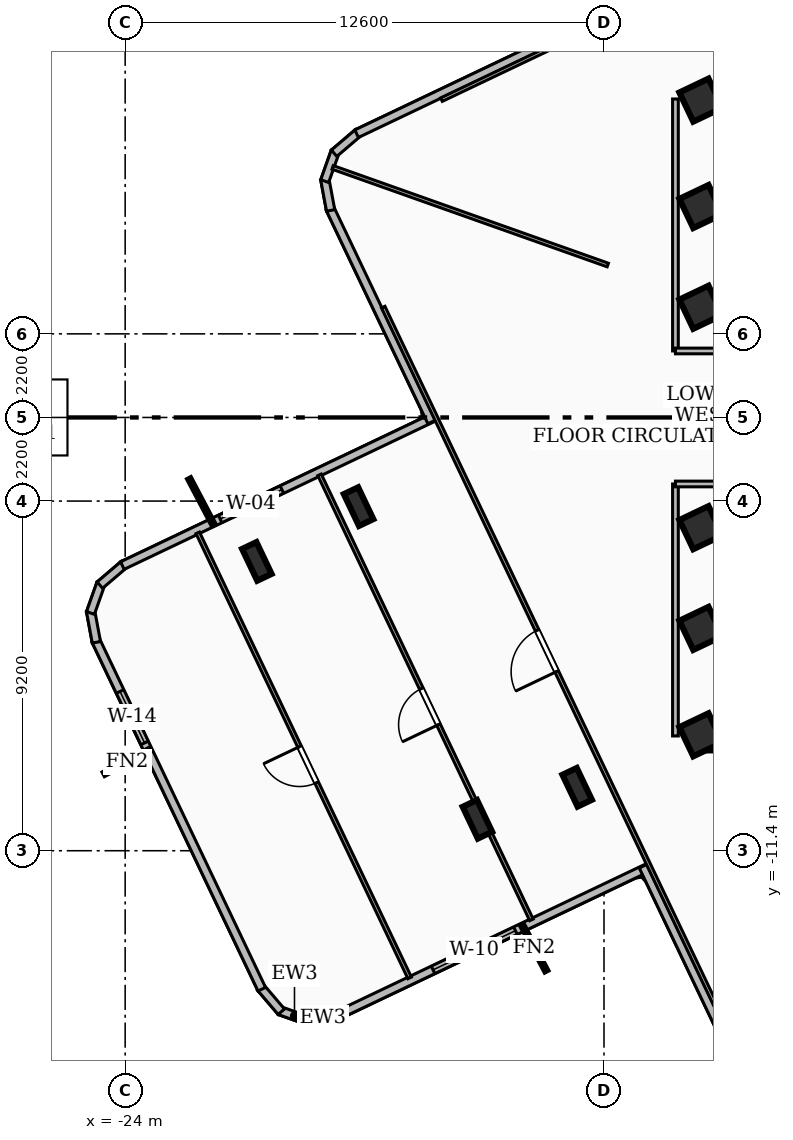
"""IFC4 building model, lengths in metres.
Left out: names, types, materials, properties, quantities, classifications, styles, units other than length and angle.
Written with IfcOpenShell. Run it as: python <this file> out.ifc"""

import sys

from ifc_helpers import new_model, si_unit, direction, frame, frame_2d, origin, origin_2d, place, context, subcontext, project, spatial, rectangle, i_section, extrude, element, fill, save


model = new_model("IFC4")
c1 = context("Model", 3, precision=1e-05, world=origin(), true_north=direction((0.0, 1.0)))
c2 = subcontext(c1, "Body", "Model", "MODEL_VIEW")
j1 = project(units=[si_unit("LENGTHUNIT", "METRE"), si_unit("PLANEANGLEUNIT", "RADIAN")], contexts=[c1])
p1 = place(None, origin())
s1 = spatial("IfcSite", under=j1, at=p1, CompositionType="ELEMENT")
p2 = place(p1, origin())
s2 = spatial("IfcBuilding", under=s1, at=p2, CompositionType="ELEMENT")
p3 = place(p2, frame((0.0, 0.0, 188.28)))
s3 = spatial("IfcBuildingStorey", under=s2, at=p3, CompositionType="ELEMENT", Elevation=188.28)
for number, where, z_axis, x_axis in (
    (1, (-8.78, 8.535, 0.0), (0.0, 0.0, 1.0), (1.0, 0.0, 0.0)),
    (2, (8.78, -8.535, 0.0), (0.0, 0.0, 1.0), (-1.0, 0.0, 0.0)),
):
    element("IfcWall", number, at=place(p3, frame(where, z_axis=z_axis, x_axis=x_axis)), inside=s3, PredefinedType="SHEAR", context=c2, shape_type="SweptSolid", body=[
        extrude(rectangle(XDim=17.56, YDim=0.45, at=frame_2d((8.78, 0.0))), origin(), (0.0, 0.0, 1.0), 4.06),
    ])
for number, where, z_axis, x_axis in (
    (3, (-8.85, -5.55, 0.0), (0.0, 0.0, 1.0), (0.903, 0.43, 0.0)),
    (4, (-8.85, -2.9, 0.0), (0.0, 0.0, 1.0), (0.903, 0.43, 0.0)),
    (5, (-8.85, 2.9, 0.0), (0.0, 0.0, 1.0), (0.903, 0.43, 0.0)),
    (6, (-8.85, 5.55, 0.0), (0.0, 0.0, 1.0), (0.903, 0.43, 0.0)),
    (7, (-8.85, 8.35, 0.0), (0.0, 0.0, 1.0), (0.903, 0.43, 0.0)),
    (8, (-8.85, -8.35, 0.0), (0.0, 0.0, 1.0), (0.903, 0.43, 0.0)),
):
    element("IfcColumn", number, at=place(p3, frame(where, z_axis=z_axis, x_axis=x_axis)), inside=s3, PredefinedType="COLUMN", context=c2, shape_type="SweptSolid", body=[
        extrude(rectangle(XDim=0.85, YDim=0.85, at=origin_2d()), origin(), (0.0, 0.0, 1.0), 4.32),
    ])
for number, where, z_axis, x_axis in (
    (9, (-17.858, -2.346, 0.0), (0.0, 0.0, 1.0), (0.903, 0.43, 0.0)),
    (10, (-12.106, -9.731, 0.0), (0.0, 0.0, 1.0), (0.903, 0.43, 0.0)),
    (11, (-20.535, -3.788, 0.0), (0.0, 0.0, 1.0), (0.903, 0.43, 0.0)),
    (12, (-14.731, -10.573, 0.0), (0.0, 0.0, 1.0), (0.903, 0.43, 0.0)),
):
    element("IfcColumn", number, at=place(p3, frame(where, z_axis=z_axis, x_axis=x_axis)), inside=s3, PredefinedType="COLUMN", context=c2, shape_type="SweptSolid", body=[
        extrude(i_section(OverallWidth=0.418, OverallDepth=0.927, WebThickness=0.019, FlangeThickness=0.032, at=origin_2d()), origin(), (0.0, 0.0, 1.0), 4.32),
    ])
p4 = place(p3, frame((-10.255, -11.848, 0.0), z_axis=(0.0, 0.0, 1.0), x_axis=(-0.902833615009, -0.429990073851, 0.0)))
e13 = element("IfcWall", 13, at=p4, inside=s3, PredefinedType="SOLIDWALL", context=c2, shape_type="SweptSolid", body=[
    extrude(rectangle(XDim=9.058, YDim=0.22, at=frame_2d((4.529, 0.0))), origin(), (0.0, 0.0, 1.0), 4.06),
])
p5 = place(p4, frame((3.85, 0.0, 0.85)))
e14 = element("IfcOpeningElement", 14, at=p5, cuts=e13, PredefinedType="OPENING", context=c2, shape_type="SweptSolid", body=[
    extrude(rectangle(XDim=2.4, YDim=1.65, at=frame_2d((1.2, 0.825))), frame((0.0, 0.12, 0.0), z_axis=(0.0, -1.0, 0.0), x_axis=(1.0, 0.0, 0.0)), (0.0, 0.0, 1.0), 0.24),
])
p6 = place(p3, frame((-18.385, -15.727, 0.0), z_axis=(0.0, 0.0, 1.0), x_axis=(-0.983152022253, -0.182789773071, 0.0)))
e15 = element("IfcWall", 15, at=p6, inside=s3, PredefinedType="SOLIDWALL", context=c2, shape_type="SweptSolid", body=[
    extrude(rectangle(XDim=0.836, YDim=0.22, at=frame_2d((0.418, 0.0))), origin(), (0.0, 0.0, 1.0), 4.06),
])
p7 = place(p3, frame((-19.158, -15.883, 0.0), z_axis=(0.0, 0.0, 1.0), x_axis=(-0.94246708165, 0.334298968001, 0.0)))
e16 = element("IfcWall", 16, at=p7, inside=s3, PredefinedType="SOLIDWALL", context=c2, shape_type="SweptSolid", body=[
    extrude(rectangle(XDim=0.82, YDim=0.22, at=frame_2d((0.41, 0.0))), origin(), (0.0, 0.0, 1.0), 4.06),
])
p8 = place(p3, frame((-19.891, -15.636, 0.0), z_axis=(0.0, 0.0, 1.0), x_axis=(-0.64893164197, 0.760846715213, 0.0)))
e17 = element("IfcWall", 17, at=p8, inside=s3, PredefinedType="SOLIDWALL", context=c2, shape_type="SweptSolid", body=[
    extrude(rectangle(XDim=0.833, YDim=0.22, at=frame_2d((0.417, 0.0))), origin(), (0.0, 0.0, 1.0), 4.06),
])
p9 = place(p3, frame((-20.405, -15.044, 0.0), z_axis=(0.0, 0.0, 1.0), x_axis=(-0.429803955781, 0.902922233415, 0.0)))
e18 = element("IfcWall", 18, at=p9, inside=s3, PredefinedType="SOLIDWALL", context=c2, shape_type="SweptSolid", body=[
    extrude(rectangle(XDim=10.163, YDim=0.22, at=frame_2d((5.081, 0.0))), origin(), (0.0, 0.0, 1.0), 4.06),
])
p10 = place(p9, frame((7.177, 0.0, 0.85)))
e19 = element("IfcOpeningElement", 19, at=p10, cuts=e18, PredefinedType="OPENING", context=c2, shape_type="SweptSolid", body=[
    extrude(rectangle(XDim=1.5, YDim=1.5, at=frame_2d((0.75, 0.75))), frame((0.0, 0.12, 0.0), z_axis=(0.0, -1.0, 0.0), x_axis=(1.0, 0.0, 0.0)), (0.0, 0.0, 1.0), 0.24),
])
p11 = place(p3, frame((-24.757, -5.916, 0.0), z_axis=(0.0, 0.0, 1.0), x_axis=(-0.182999909077, 0.983112930074, 0.0)))
e20 = element("IfcWall", 20, at=p11, inside=s3, PredefinedType="SOLIDWALL", context=c2, shape_type="SweptSolid", body=[
    extrude(rectangle(XDim=0.835, YDim=0.22, at=frame_2d((0.417, 0.0))), origin(), (0.0, 0.0, 1.0), 4.06),
])
p12 = place(p3, frame((-24.913, -5.144, 0.0), z_axis=(0.0, 0.0, 1.0), x_axis=(0.334298968001, 0.94246708165, 0.0)))
e21 = element("IfcWall", 21, at=p12, inside=s3, PredefinedType="SOLIDWALL", context=c2, shape_type="SweptSolid", body=[
    extrude(rectangle(XDim=0.82, YDim=0.22, at=frame_2d((0.41, 0.0))), origin(), (0.0, 0.0, 1.0), 4.06),
])
p13 = place(p3, frame((-24.666, -4.411, 0.0), z_axis=(0.0, 0.0, 1.0), x_axis=(0.760846715213, 0.64893164197, 0.0)))
e22 = element("IfcWall", 22, at=p13, inside=s3, PredefinedType="SOLIDWALL", context=c2, shape_type="SweptSolid", body=[
    extrude(rectangle(XDim=0.833, YDim=0.22, at=frame_2d((0.417, 0.0))), origin(), (0.0, 0.0, 1.0), 4.06),
])
p14 = place(p3, frame((-24.074, -3.897, 0.0), z_axis=(0.0, 0.0, 1.0), x_axis=(0.902868488288, 0.429916844117, 0.0)))
e23 = element("IfcWall", 23, at=p14, inside=s3, PredefinedType="SOLIDWALL", context=c2, shape_type="SweptSolid", body=[
    extrude(rectangle(XDim=9.06, YDim=0.22, at=frame_2d((4.53, 0.0))), origin(), (0.0, 0.0, 1.0), 4.06),
])
p15 = place(p14, frame((2.85, 0.0, 0.85)))
e24 = element("IfcOpeningElement", 24, at=p15, cuts=e23, PredefinedType="OPENING", context=c2, shape_type="SweptSolid", body=[
    extrude(rectangle(XDim=1.8, YDim=2.0, at=frame_2d((0.9, 1.0))), frame((0.0, 0.12, 0.0), z_axis=(0.0, -1.0, 0.0), x_axis=(1.0, 0.0, 0.0)), (0.0, 0.0, 1.0), 0.24),
])
p16 = place(p3, frame((-15.935, -0.119, 0.0), z_axis=(0.0, 0.0, 1.0), x_axis=(-0.429997588734, 0.902830035878, 0.0)))
e25 = element("IfcWall", 25, at=p16, inside=s3, PredefinedType="SOLIDWALL", context=c2, shape_type="SweptSolid", body=[
    extrude(rectangle(XDim=6.218, YDim=0.22, at=frame_2d((3.109, 0.0))), origin(), (0.0, 0.0, 1.0), 4.06),
])
p17 = place(p3, frame((-18.593, 5.447, 0.0), z_axis=(0.0, 0.0, 1.0), x_axis=(-0.183282428617, 0.983060298944, 0.0)))
e26 = element("IfcWall", 26, at=p17, inside=s3, PredefinedType="SOLIDWALL", context=c2, shape_type="SweptSolid", body=[
    extrude(rectangle(XDim=0.835, YDim=0.22, at=frame_2d((0.417, 0.0))), origin(), (0.0, 0.0, 1.0), 4.06),
])
p18 = place(p3, frame((-18.749, 6.219, 0.0), z_axis=(0.0, 0.0, 1.0), x_axis=(0.33403451258, 0.942560843875, 0.0)))
e27 = element("IfcWall", 27, at=p18, inside=s3, PredefinedType="SOLIDWALL", context=c2, shape_type="SweptSolid", body=[
    extrude(rectangle(XDim=0.82, YDim=0.22, at=frame_2d((0.41, 0.0))), origin(), (0.0, 0.0, 1.0), 4.06),
])
p19 = place(p3, frame((-18.502, 6.952, 0.0), z_axis=(0.0, 0.0, 1.0), x_axis=(0.76070207285, 0.649101191157, 0.0)))
e28 = element("IfcWall", 28, at=p19, inside=s3, PredefinedType="SOLIDWALL", context=c2, shape_type="SweptSolid", body=[
    extrude(rectangle(XDim=0.833, YDim=0.22, at=frame_2d((0.417, 0.0))), origin(), (0.0, 0.0, 1.0), 4.06),
])
for number, where, z_axis, x_axis in (
    (29, (-17.91, 7.466, 0.0), (0.0, 0.0, 1.0), (0.903, 0.43, 0.0)),
    (30, (-7.466, -17.91, 0.0), (0.0, 0.0, 1.0), (-0.43, 0.903, 0.0)),
):
    element("IfcWall", number, at=place(p3, frame(where, z_axis=z_axis, x_axis=x_axis)), inside=s3, PredefinedType="SOLIDWALL", context=c2, shape_type="SweptSolid", body=[
        extrude(rectangle(XDim=6.76, YDim=0.22, at=frame_2d((3.38, 0.0))), origin(), (0.0, 0.0, 1.0), 4.06),
    ])
p20 = place(p3, frame((-9.52, 1.75, 0.0), z_axis=(0.0, 0.0, 1.0), x_axis=(0.0, 1.0, 0.0)))
e31 = element("IfcWall", 31, at=p20, inside=s3, PredefinedType="PARTITIONING", context=c2, shape_type="SweptSolid", body=[
    extrude(rectangle(XDim=6.63, YDim=0.15, at=frame_2d((3.315, 0.0))), origin(), (0.0, 0.0, 1.0), 4.06),
])
p21 = place(p3, frame((-7.85, 1.75, 0.0), z_axis=(0.0, 0.0, 1.0), x_axis=(-1.0, 0.0, 0.0)))
e32 = element("IfcWall", 32, at=p21, inside=s3, PredefinedType="PARTITIONING", context=c2, shape_type="SweptSolid", body=[
    extrude(rectangle(XDim=1.67, YDim=0.15, at=frame_2d((0.835, 0.0))), origin(), (0.0, 0.0, 1.0), 3.29),
])
p22 = place(p3, frame((-9.52, -8.38, 0.0), z_axis=(0.0, 0.0, 1.0), x_axis=(0.0, 1.0, 0.0)))
e33 = element("IfcWall", 33, at=p22, inside=s3, PredefinedType="PARTITIONING", context=c2, shape_type="SweptSolid", body=[
    extrude(rectangle(XDim=6.63, YDim=0.15, at=frame_2d((3.315, 0.0))), origin(), (0.0, 0.0, 1.0), 3.364),
])
p23 = place(p3, frame((-7.85, -1.75, 0.0), z_axis=(0.0, 0.0, 1.0), x_axis=(-1.0, 0.0, 0.0)))
e34 = element("IfcWall", 34, at=p23, inside=s3, PredefinedType="PARTITIONING", context=c2, shape_type="SweptSolid", body=[
    extrude(rectangle(XDim=1.67, YDim=0.15, at=frame_2d((0.835, 0.0))), origin(), (0.0, 0.0, 1.0), 3.29),
])
p24 = place(p3, frame((-11.3, 4.011, 0.0), z_axis=(0.0, 0.0, 1.0), x_axis=(-0.942439374513, 0.334377070636, 0.0)))
e35 = element("IfcWall", 35, at=p24, inside=s3, PredefinedType="PARTITIONING", context=c2, shape_type="SweptSolid", body=[
    extrude(rectangle(XDim=7.683, YDim=0.1, at=frame_2d((3.842, 0.0))), origin(), (0.0, 0.0, 1.0), 4.06),
])
p25 = place(p3, frame((-15.677, 8.362, 0.0), z_axis=(0.0, 0.0, 1.0), x_axis=(0.902864685064, 0.429924831179, 0.0)))
e36 = element("IfcWall", 36, at=p25, inside=s3, PredefinedType="PARTITIONING", context=c2, shape_type="SweptSolid", body=[
    extrude(rectangle(XDim=20.58, YDim=0.1, at=frame_2d((10.29, 0.0))), origin(), (0.0, 0.0, 1.0), 3.364),
])
p26 = place(p25, frame((9.96, 0.0, 0.0)))
e37 = element("IfcOpeningElement", 37, at=p26, cuts=e36, PredefinedType="OPENING", context=c2, shape_type="SweptSolid", body=[
    extrude(rectangle(XDim=1.2, YDim=2.1, at=frame_2d((0.6, 1.05))), frame((0.0, 0.06, 0.0), z_axis=(0.0, -1.0, 0.0), x_axis=(1.0, 0.0, 0.0)), (0.0, 0.0, 1.0), 0.12),
])
p27 = place(p3, frame((-8.362, -15.677, 0.0), z_axis=(0.0, 0.0, 1.0), x_axis=(-0.429924831179, 0.902864685064, 0.0)))
e38 = element("IfcWall", 38, at=p27, inside=s3, PredefinedType="PARTITIONING", context=c2, shape_type="SweptSolid", body=[
    extrude(rectangle(XDim=20.58, YDim=0.1, at=frame_2d((10.29, 0.0))), origin(), (0.0, 0.0, 1.0), 3.364),
])
p28 = place(p27, frame((9.96, 0.0, 0.0)))
e39 = element("IfcOpeningElement", 39, at=p28, cuts=e38, PredefinedType="OPENING", context=c2, shape_type="SweptSolid", body=[
    extrude(rectangle(XDim=1.2, YDim=2.1, at=frame_2d((0.6, 1.05))), frame((0.0, 0.06, 0.0), z_axis=(0.0, -1.0, 0.0), x_axis=(1.0, 0.0, 0.0)), (0.0, 0.0, 1.0), 0.12),
])
p29 = place(p3, frame((-13.309, -13.22, 0.0), z_axis=(0.0, 0.0, 1.0), x_axis=(-0.429918235923, 0.902867825554, 0.0)))
e40 = element("IfcWall", 40, at=p29, inside=s3, PredefinedType="PARTITIONING", context=c2, shape_type="SweptSolid", body=[
    extrude(rectangle(XDim=12.97, YDim=0.1, at=frame_2d((6.485, 0.0))), origin(), (0.0, 0.0, 1.0), 3.364),
])
p30 = place(p29, frame((5.69, 0.0, 0.0)))
e41 = element("IfcOpeningElement", 41, at=p30, cuts=e40, PredefinedType="OPENING", context=c2, shape_type="SweptSolid", body=[
    extrude(rectangle(XDim=1.05, YDim=2.08, at=frame_2d((0.525, 1.04))), frame((0.0, 0.06, 0.0), z_axis=(0.0, -1.0, 0.0), x_axis=(1.0, 0.0, 0.0)), (0.0, 0.0, 1.0), 0.12),
])
p31 = place(p3, frame((-16.514, -14.746, 0.0), z_axis=(0.0, 0.0, 1.0), x_axis=(-0.429926273701, 0.902863998164, 0.0)))
e42 = element("IfcWall", 42, at=p31, inside=s3, PredefinedType="PARTITIONING", context=c2, shape_type="SweptSolid", body=[
    extrude(rectangle(XDim=12.97, YDim=0.1, at=frame_2d((6.485, 0.0))), origin(), (0.0, 0.0, 1.0), 4.06),
])
p32 = place(p31, frame((5.69, 0.0, 0.0)))
e43 = element("IfcOpeningElement", 43, at=p32, cuts=e42, PredefinedType="OPENING", context=c2, shape_type="SweptSolid", body=[
    extrude(rectangle(XDim=1.05, YDim=2.08, at=frame_2d((0.525, 1.04))), frame((0.0, 0.06, 0.0), z_axis=(0.0, -1.0, 0.0), x_axis=(1.0, 0.0, 0.0)), (0.0, 0.0, 1.0), 0.12),
])
p33 = place(p5, origin())
e44 = element("IfcWindow", 44, at=p33, inside=s3, PartitioningType="SINGLE_PANEL", PredefinedType="WINDOW", context=c2, shape_type="SweptSolid", body=[
    extrude(rectangle(XDim=2.4, YDim=1.65, at=frame_2d((1.2, 0.825))), frame((0.0, 0.03, 0.0), z_axis=(0.0, -1.0, 0.0), x_axis=(1.0, 0.0, 0.0)), (0.0, 0.0, 1.0), 0.06),
])
fill(e14, e44)
p34 = place(p10, origin())
e45 = element("IfcWindow", 45, at=p34, inside=s3, PartitioningType="SINGLE_PANEL", PredefinedType="WINDOW", context=c2, shape_type="SweptSolid", body=[
    extrude(rectangle(XDim=1.5, YDim=1.5, at=frame_2d((0.75, 0.75))), frame((0.0, 0.03, 0.0), z_axis=(0.0, -1.0, 0.0), x_axis=(1.0, 0.0, 0.0)), (0.0, 0.0, 1.0), 0.06),
])
fill(e19, e45)
p35 = place(p15, origin())
e46 = element("IfcWindow", 46, at=p35, inside=s3, PartitioningType="SINGLE_PANEL", PredefinedType="WINDOW", context=c2, shape_type="SweptSolid", body=[
    extrude(rectangle(XDim=1.8, YDim=2.0, at=frame_2d((0.9, 1.0))), frame((0.0, 0.03, 0.0), z_axis=(0.0, -1.0, 0.0), x_axis=(1.0, 0.0, 0.0)), (0.0, 0.0, 1.0), 0.06),
])
fill(e24, e46)
p36 = place(p28, origin())
e47 = element("IfcDoor", 47, at=p36, inside=s3, OperationType="SINGLE_SWING_LEFT", PredefinedType="DOOR", context=c2, shape_type="SweptSolid", body=[
    extrude(rectangle(XDim=1.2, YDim=2.1, at=frame_2d((0.6, 1.05))), frame((0.0, 0.025, 0.0), z_axis=(0.0, -1.0, 0.0), x_axis=(1.0, 0.0, 0.0)), (0.0, 0.0, 1.0), 0.05),
])
fill(e39, e47)
p37 = place(p30, origin())
e48 = element("IfcDoor", 48, at=p37, inside=s3, OperationType="SINGLE_SWING_LEFT", PredefinedType="DOOR", context=c2, shape_type="SweptSolid", body=[
    extrude(rectangle(XDim=1.05, YDim=2.08, at=frame_2d((0.525, 1.04))), frame((0.0, 0.025, 0.0), z_axis=(0.0, -1.0, 0.0), x_axis=(1.0, 0.0, 0.0)), (0.0, 0.0, 1.0), 0.05),
])
fill(e41, e48)
p38 = place(p32, origin())
e49 = element("IfcDoor", 49, at=p38, inside=s3, OperationType="SINGLE_SWING_RIGHT", PredefinedType="DOOR", context=c2, shape_type="SweptSolid", body=[
    extrude(rectangle(XDim=1.05, YDim=2.08, at=frame_2d((0.525, 1.04))), frame((0.0, 0.025, 0.0), z_axis=(0.0, -1.0, 0.0), x_axis=(1.0, 0.0, 0.0)), (0.0, 0.0, 1.0), 0.05),
])
fill(e43, e49)
save(model, sys.argv[1])
